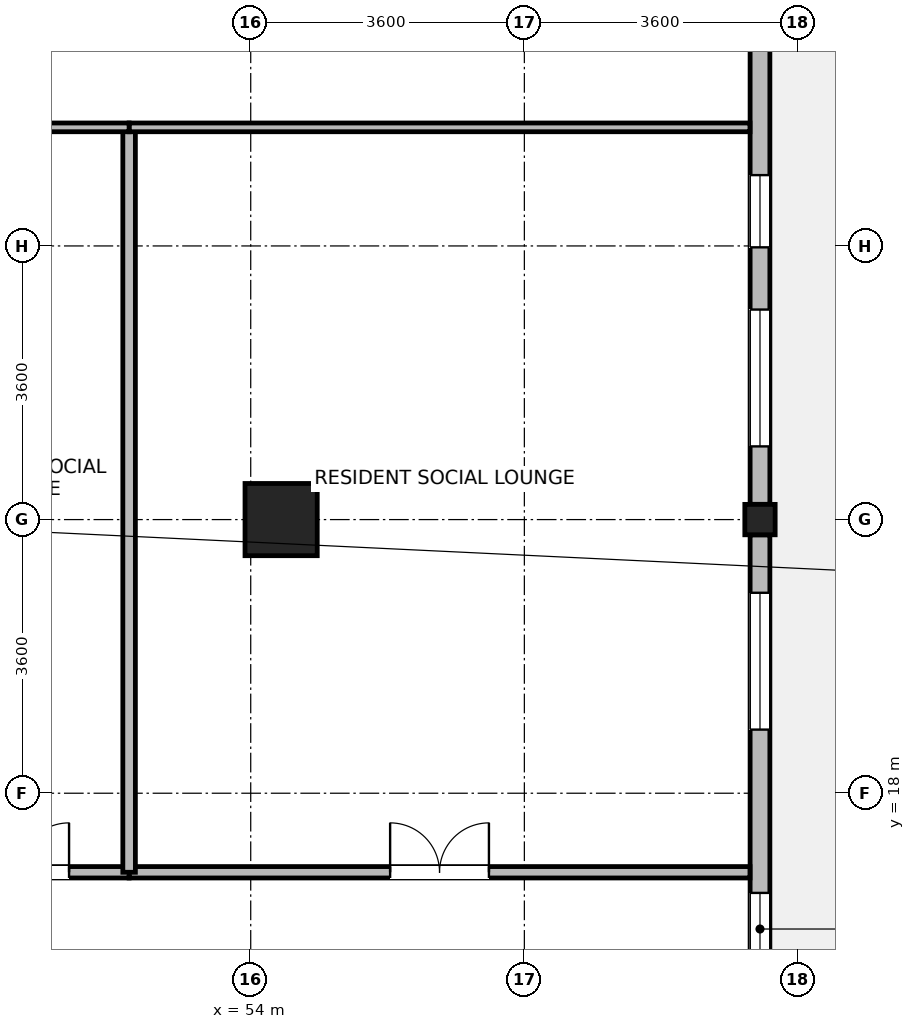
"""IFC4 building model, lengths in metres.
Left out: names, types, materials, properties, quantities, classifications, styles, units other than length and angle.
Written with IfcOpenShell. Run it as: python <this file> out.ifc"""

import sys

from ifc_helpers import new_model, si_unit, direction, frame, frame_2d, origin, origin_2d, place, context, subcontext, project, spatial, rectangle, i_section, extrude, source, transform, mapped, element, fill, save


model = new_model("IFC4")
c1 = context("Model", 3, precision=1e-05, world=origin(), true_north=direction((0.0, 1.0)))
c2 = subcontext(c1, "Body", "Model", "MODEL_VIEW")
j1 = project(units=[si_unit("LENGTHUNIT", "METRE"), si_unit("PLANEANGLEUNIT", "RADIAN")], contexts=[c1])
p1 = place(None, origin())
s1 = spatial("IfcSite", under=j1, at=p1, CompositionType="ELEMENT")
p2 = place(p1, origin())
s2 = spatial("IfcBuilding", under=s1, at=p2, CompositionType="ELEMENT")
p3 = place(p2, frame((0.0, 0.0, 220.3)))
s3 = spatial("IfcBuildingStorey", under=s2, at=p3, CompositionType="ELEMENT", Elevation=220.3)
m1 = source(origin(), c2, "Body", "SweptSolid", [
    extrude(rectangle(XDim=0.95, YDim=0.95, at=origin_2d()), origin(), (0.0, 0.0, 1.0), 3.7),
])
p4 = place(p3, frame((54.4, 21.6, 0.0), z_axis=(0.0, 0.0, 1.0), x_axis=(1.0, 0.0, 0.0)))
e1 = element("IfcColumn", 1, at=p4, inside=s3, PredefinedType="COLUMN", context=c2, shape_type="MappedRepresentation", body=[
    mapped(m1, transform((0.0, 0.0, 0.0), x_axis=(1.0, 0.0, 0.0), y_axis=(0.0, 1.0, 0.0), z_axis=(0.0, 0.0, 1.0), scale=1.0)),
])
m2 = source(origin(), c2, "Body", "SweptSolid", [
    extrude(i_section(OverallWidth=0.399, OverallDepth=0.4, WebThickness=0.017, FlangeThickness=0.023, FilletRadius=0.015, at=origin_2d()), origin(), (0.0, 0.0, 1.0), 3.7),
])
p5 = place(p3, frame((60.7, 21.6, 0.0), z_axis=(0.0, 0.0, 1.0), x_axis=(1.0, 0.0, 0.0)))
e2 = element("IfcColumn", 2, at=p5, inside=s3, PredefinedType="COLUMN", context=c2, shape_type="MappedRepresentation", body=[
    mapped(m2, transform((0.0, 0.0, 0.0), x_axis=(1.0, 0.0, 0.0), y_axis=(0.0, 1.0, 0.0), z_axis=(0.0, 0.0, 1.0), scale=1.0)),
])
p6 = place(p3, frame((60.7, 21.399, 0.0), z_axis=(0.0, 0.0, 1.0), x_axis=(0.0, -1.0, 0.0)))
e3 = element("IfcWall", 3, at=p6, inside=s3, PredefinedType="STANDARD", context=c2, shape_type="SweptSolid", body=[
    extrude(rectangle(XDim=6.648, YDim=0.26, at=frame_2d((3.324, 0.0))), origin(), (0.0, 0.0, 1.0), 3.05),
])
p7 = place(p6, frame((0.762, 0.0, 0.85)))
e4 = element("IfcOpeningElement", 4, at=p7, cuts=e3, PredefinedType="OPENING", context=c2, shape_type="SweptSolid", body=[
    extrude(rectangle(XDim=1.8, YDim=1.85, at=frame_2d((0.9, 0.925))), frame((0.0, 0.14, 0.0), z_axis=(0.0, -1.0, 0.0), x_axis=(1.0, 0.0, 0.0)), (0.0, 0.0, 1.0), 0.28),
])
p8 = place(p6, frame((4.71, 0.0, 0.85)))
e5 = element("IfcOpeningElement", 5, at=p8, cuts=e3, PredefinedType="OPENING", context=c2, shape_type="SweptSolid", body=[
    extrude(rectangle(XDim=0.95, YDim=1.75, at=frame_2d((0.475, 0.875))), frame((0.0, 0.14, 0.0), z_axis=(0.0, -1.0, 0.0), x_axis=(1.0, 0.0, 0.0)), (0.0, 0.0, 1.0), 0.28),
])
p9 = place(p3, frame((60.7, 28.449, 0.0), z_axis=(0.0, 0.0, 1.0), x_axis=(0.0, -1.0, 0.0)))
e6 = element("IfcWall", 6, at=p9, inside=s3, PredefinedType="STANDARD", context=c2, shape_type="SweptSolid", body=[
    extrude(rectangle(XDim=6.648, YDim=0.26, at=frame_2d((3.324, 0.0))), origin(), (0.0, 0.0, 1.0), 3.05),
])
p10 = place(p9, frame((4.086, 0.0, 0.85)))
e7 = element("IfcOpeningElement", 7, at=p10, cuts=e6, PredefinedType="OPENING", context=c2, shape_type="SweptSolid", body=[
    extrude(rectangle(XDim=1.8, YDim=1.85, at=frame_2d((0.9, 0.925))), frame((0.0, 0.14, 0.0), z_axis=(0.0, -1.0, 0.0), x_axis=(1.0, 0.0, 0.0)), (0.0, 0.0, 1.0), 0.28),
])
p11 = place(p9, frame((2.317, 0.0, 0.85)))
e8 = element("IfcOpeningElement", 8, at=p11, cuts=e6, PredefinedType="OPENING", context=c2, shape_type="SweptSolid", body=[
    extrude(rectangle(XDim=0.95, YDim=1.75, at=frame_2d((0.475, 0.875))), frame((0.0, 0.14, 0.0), z_axis=(0.0, -1.0, 0.0), x_axis=(1.0, 0.0, 0.0)), (0.0, 0.0, 1.0), 0.28),
])
p12 = place(p3, frame((52.4, 16.96, 0.0), z_axis=(0.0, 0.0, 1.0), x_axis=(1.0, 0.0, 0.0)))
e9 = element("IfcWall", 9, at=p12, inside=s3, PredefinedType="PARTITIONING", context=c2, shape_type="SweptSolid", body=[
    extrude(rectangle(XDim=8.168, YDim=0.15, at=frame_2d((4.084, 0.0))), origin(), (0.0, 0.0, 1.0), 3.45),
])
p13 = place(p12, frame((3.434, 0.0, 0.0)))
e10 = element("IfcOpeningElement", 10, at=p13, cuts=e9, PredefinedType="OPENING", context=c2, shape_type="SweptSolid", body=[
    extrude(rectangle(XDim=1.3, YDim=2.12, at=frame_2d((0.65, 1.06))), frame((0.0, 0.085, 0.0), z_axis=(0.0, -1.0, 0.0), x_axis=(1.0, 0.0, 0.0)), (0.0, 0.0, 1.0), 0.17),
])
p14 = place(p3, frame((49.52, 16.96, 0.0), z_axis=(0.0, 0.0, 1.0), x_axis=(1.0, 0.0, 0.0)))
e11 = element("IfcWall", 11, at=p14, inside=s3, PredefinedType="PARTITIONING", context=c2, shape_type="SweptSolid", body=[
    extrude(rectangle(XDim=2.88, YDim=0.15, at=frame_2d((1.44, 0.0))), origin(), (0.0, 0.0, 1.0), 3.45),
])
p15 = place(p14, frame((0.79, 0.0, 0.0)))
e12 = element("IfcOpeningElement", 12, at=p15, cuts=e11, PredefinedType="OPENING", context=c2, shape_type="SweptSolid", body=[
    extrude(rectangle(XDim=1.3, YDim=2.12, at=frame_2d((0.65, 1.06))), frame((0.0, 0.085, 0.0), z_axis=(0.0, -1.0, 0.0), x_axis=(1.0, 0.0, 0.0)), (0.0, 0.0, 1.0), 0.17),
])
p16 = place(p3, frame((52.4, 16.96, 0.0), z_axis=(0.0, 0.0, 1.0), x_axis=(0.0, 1.0, 0.0)))
e13 = element("IfcWall", 13, at=p16, inside=s3, PredefinedType="PARTITIONING", context=c2, shape_type="SweptSolid", body=[
    extrude(rectangle(XDim=9.8, YDim=0.165, at=frame_2d((4.9, 0.0))), origin(), (0.0, 0.0, 1.0), 3.45),
])
p17 = place(p3, frame((52.4, 26.76, 0.0), z_axis=(0.0, 0.0, 1.0), x_axis=(1.0, 0.0, 0.0)))
e14 = element("IfcWall", 14, at=p17, inside=s3, PredefinedType="PARTITIONING", context=c2, shape_type="SweptSolid", body=[
    extrude(rectangle(XDim=8.168, YDim=0.115, at=frame_2d((4.084, 0.0))), origin(), (0.0, 0.0, 1.0), 3.45),
])
p18 = place(p3, frame((49.52, 26.76, 0.0), z_axis=(0.0, 0.0, 1.0), x_axis=(1.0, 0.0, 0.0)))
e15 = element("IfcWall", 15, at=p18, inside=s3, PredefinedType="PARTITIONING", context=c2, shape_type="SweptSolid", body=[
    extrude(rectangle(XDim=2.88, YDim=0.115, at=frame_2d((1.44, 0.0))), origin(), (0.0, 0.0, 1.0), 3.45),
])
p19 = place(p7, origin())
e16 = element("IfcWindow", 16, at=p19, inside=s3, PartitioningType="SINGLE_PANEL", PredefinedType="WINDOW", context=c2, shape_type="SweptSolid", body=[
    extrude(rectangle(XDim=1.8, YDim=1.85, at=frame_2d((0.9, 0.925))), frame((0.0, 0.03, 0.0), z_axis=(0.0, -1.0, 0.0), x_axis=(1.0, 0.0, 0.0)), (0.0, 0.0, 1.0), 0.06),
])
fill(e4, e16)
p20 = place(p8, origin())
e17 = element("IfcWindow", 17, at=p20, inside=s3, PartitioningType="SINGLE_PANEL", PredefinedType="WINDOW", context=c2, shape_type="SweptSolid", body=[
    extrude(rectangle(XDim=0.95, YDim=1.75, at=frame_2d((0.475, 0.875))), frame((0.0, 0.03, 0.0), z_axis=(0.0, -1.0, 0.0), x_axis=(1.0, 0.0, 0.0)), (0.0, 0.0, 1.0), 0.06),
])
fill(e5, e17)
p21 = place(p10, origin())
e18 = element("IfcWindow", 18, at=p21, inside=s3, PartitioningType="SINGLE_PANEL", PredefinedType="WINDOW", context=c2, shape_type="SweptSolid", body=[
    extrude(rectangle(XDim=1.8, YDim=1.85, at=frame_2d((0.9, 0.925))), frame((0.0, 0.03, 0.0), z_axis=(0.0, -1.0, 0.0), x_axis=(1.0, 0.0, 0.0)), (0.0, 0.0, 1.0), 0.06),
])
fill(e7, e18)
p22 = place(p11, origin())
e19 = element("IfcWindow", 19, at=p22, inside=s3, PartitioningType="SINGLE_PANEL", PredefinedType="WINDOW", context=c2, shape_type="SweptSolid", body=[
    extrude(rectangle(XDim=0.95, YDim=1.75, at=frame_2d((0.475, 0.875))), frame((0.0, 0.03, 0.0), z_axis=(0.0, -1.0, 0.0), x_axis=(1.0, 0.0, 0.0)), (0.0, 0.0, 1.0), 0.06),
])
fill(e8, e19)
p23 = place(p13, origin())
e20 = element("IfcDoor", 20, at=p23, inside=s3, OperationType="DOUBLE_DOOR_SINGLE_SWING", PredefinedType="DOOR", context=c2, shape_type="SweptSolid", body=[
    extrude(rectangle(XDim=1.3, YDim=2.12, at=frame_2d((0.65, 1.06))), frame((0.0, 0.025, 0.0), z_axis=(0.0, -1.0, 0.0), x_axis=(1.0, 0.0, 0.0)), (0.0, 0.0, 1.0), 0.05),
])
fill(e10, e20)
p24 = place(p15, origin())
e21 = element("IfcDoor", 21, at=p24, inside=s3, OperationType="DOUBLE_DOOR_SINGLE_SWING", PredefinedType="DOOR", context=c2, shape_type="SweptSolid", body=[
    extrude(rectangle(XDim=1.3, YDim=2.12, at=frame_2d((0.65, 1.06))), frame((0.0, 0.025, 0.0), z_axis=(0.0, -1.0, 0.0), x_axis=(1.0, 0.0, 0.0)), (0.0, 0.0, 1.0), 0.05),
])
fill(e12, e21)
save(model, sys.argv[1])
